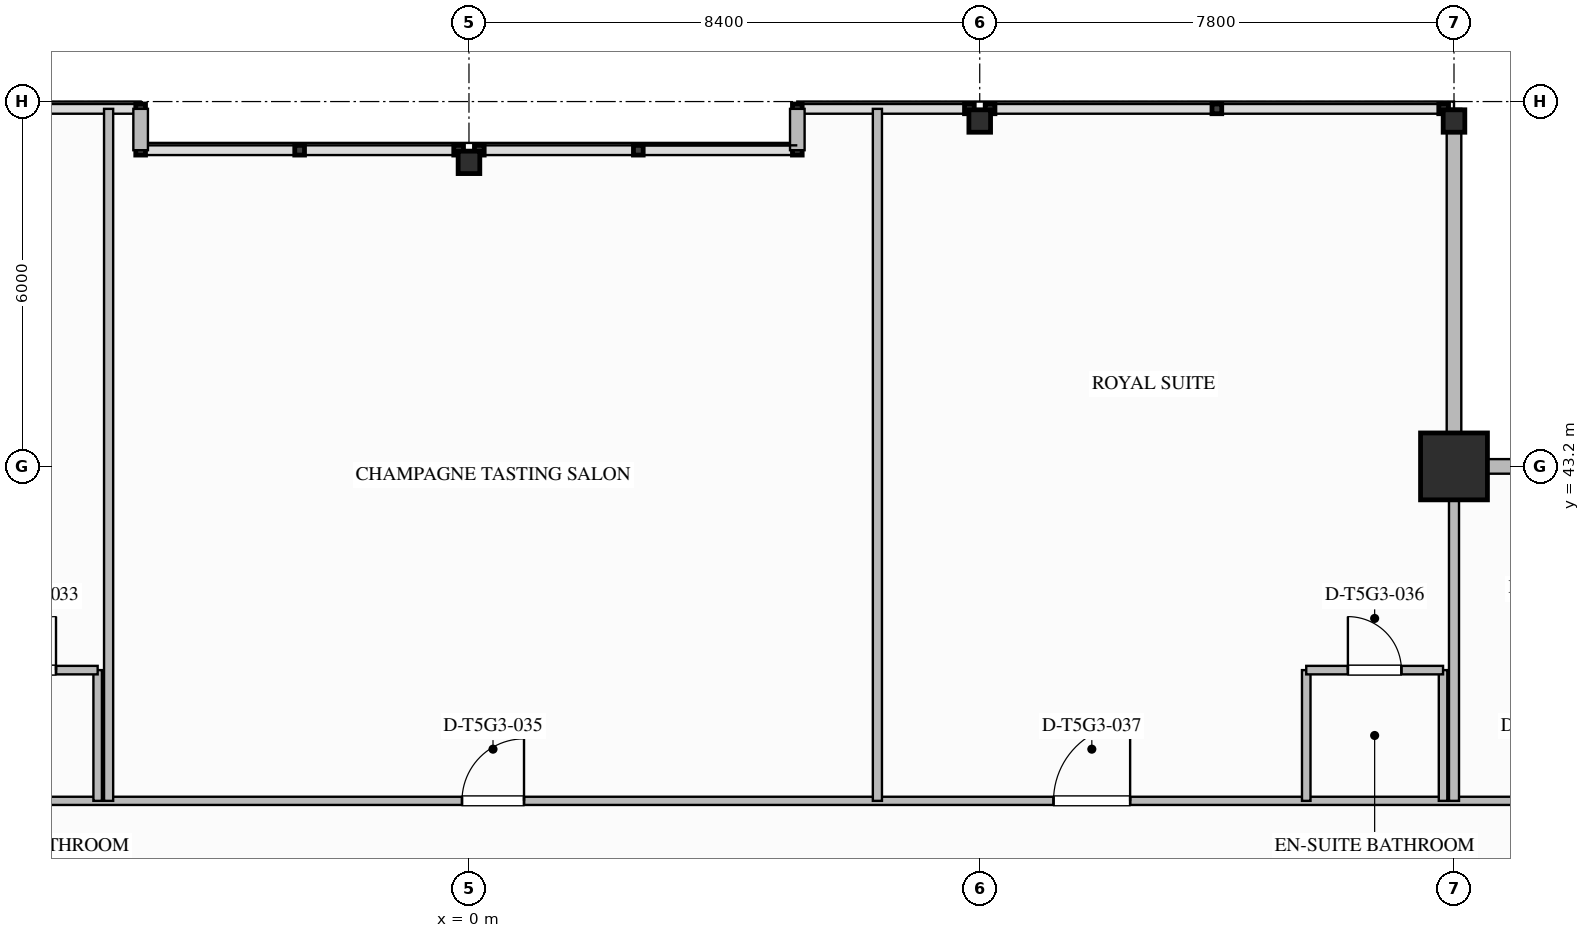
"""IFC4 building model, lengths in metres.
Left out: names, types, materials, properties, quantities, classifications, styles, units other than length and angle.
Written with IfcOpenShell. Run it as: python <this file> out.ifc"""

import sys

from ifc_helpers import new_model, si_unit, direction, frame, frame_2d, origin, origin_2d, place, context, subcontext, project, spatial, rectangle, i_section, extrude, element, fill, save


model = new_model("IFC4")
c1 = context("Model", 3, precision=1e-05, world=origin(), true_north=direction((0.0, 1.0)))
c2 = subcontext(c1, "Body", "Model", "MODEL_VIEW")
j1 = project(units=[si_unit("LENGTHUNIT", "METRE"), si_unit("PLANEANGLEUNIT", "RADIAN")], contexts=[c1])
p1 = place(None, origin())
s1 = spatial("IfcSite", under=j1, at=p1, CompositionType="ELEMENT")
p2 = place(p1, origin())
s2 = spatial("IfcBuilding", under=s1, at=p2, CompositionType="ELEMENT")
p3 = place(p2, frame((0.0, 0.0, 286.9)))
s3 = spatial("IfcBuildingStorey", under=s2, at=p3, CompositionType="ELEMENT", Elevation=286.9)
p4 = place(p3, frame((16.2, 43.2, 0.0), z_axis=(0.0, 0.0, 1.0), x_axis=(1.0, 0.0, 0.0)))
e1 = element("IfcColumn", 1, at=p4, inside=s3, PredefinedType="COLUMN", context=c2, shape_type="SweptSolid", body=[
    extrude(rectangle(XDim=1.1, YDim=1.1, at=origin_2d()), origin(), (0.0, 0.0, 1.0), 3.65),
])
for number, where, z_axis, x_axis in (
    (2, (0.0, 48.2, 0.0), (0.0, 0.0, 1.0), (0.0, 1.0, 0.0)),
    (3, (8.4, 48.88, 0.0), (0.0, 0.0, 1.0), (0.0, 1.0, 0.0)),
    (4, (16.2, 48.88, 0.0), (0.0, 0.0, 1.0), (0.0, 1.0, 0.0)),
):
    element("IfcColumn", number, at=place(p3, frame(where, z_axis=z_axis, x_axis=x_axis)), inside=s3, PredefinedType="COLUMN", context=c2, shape_type="SweptSolid", body=[
        extrude(i_section(OverallWidth=0.369, OverallDepth=0.356, WebThickness=0.011, FlangeThickness=0.018, FilletRadius=0.025, at=origin_2d()), origin(), (0.0, 0.0, 1.0), 3.647),
    ])
for number, where, z_axis, x_axis in (
    (5, (16.2, 49.08, 0.0), (0.0, 0.0, 1.0), (0.0, -1.0, 0.0)),
    (6, (16.2, 43.2, 0.0), (0.0, 0.0, 1.0), (1.0, 0.0, 0.0)),
):
    element("IfcWall", number, at=place(p3, frame(where, z_axis=z_axis, x_axis=x_axis)), inside=s3, PredefinedType="STANDARD", context=c2, shape_type="SweptSolid", body=[
        extrude(rectangle(XDim=5.88, YDim=0.24, at=frame_2d((2.94, 0.0))), origin(), (0.0, 0.0, 1.0), 2.779),
    ])
for number, where, z_axis, x_axis in (
    (7, (-5.4, 49.08, 0.0), (0.0, 0.0, 1.0), (0.0, -1.0, 0.0)),
    (8, (5.4, 48.4, 0.0), (0.0, 0.0, 1.0), (0.0, 1.0, 0.0)),
):
    element("IfcWall", number, at=place(p3, frame(where, z_axis=z_axis, x_axis=x_axis)), inside=s3, PredefinedType="STANDARD", context=c2, shape_type="SweptSolid", body=[
        extrude(rectangle(XDim=0.68, YDim=0.24, at=frame_2d((0.34, 0.0))), origin(), (0.0, 0.0, 1.0), 3.39),
    ])
p5 = place(p3, frame((-16.2, 37.7, 0.0), z_axis=(0.0, 0.0, 1.0), x_axis=(1.0, 0.0, 0.0)))
e9 = element("IfcWall", 9, at=p5, inside=s3, PredefinedType="PARTITIONING", context=c2, shape_type="SweptSolid", body=[
    extrude(rectangle(XDim=38.28, YDim=0.135, at=frame_2d((19.14, 0.0))), origin(), (0.0, 0.0, 1.0), 3.39),
])
p6 = place(p5, frame((33.355, 0.0, 0.0)))
e10 = element("IfcOpeningElement", 10, at=p6, cuts=e9, PredefinedType="OPENING", context=c2, shape_type="SweptSolid", body=[
    extrude(rectangle(XDim=1.26, YDim=2.2, at=frame_2d((0.63, 1.1))), frame((0.0, 0.077, 0.0), z_axis=(0.0, -1.0, 0.0), x_axis=(1.0, 0.0, 0.0)), (0.0, 0.0, 1.0), 0.155),
])
p7 = place(p5, frame((3.292, 0.0, 0.0)))
e11 = element("IfcOpeningElement", 11, at=p7, cuts=e9, PredefinedType="OPENING", context=c2, shape_type="SweptSolid", body=[
    extrude(rectangle(XDim=1.26, YDim=2.2, at=frame_2d((0.63, 1.1))), frame((0.0, 0.077, 0.0), z_axis=(0.0, -1.0, 0.0), x_axis=(1.0, 0.0, 0.0)), (0.0, 0.0, 1.0), 0.155),
])
p8 = place(p5, frame((16.085, 0.0, 0.0)))
e12 = element("IfcOpeningElement", 12, at=p8, cuts=e9, PredefinedType="OPENING", context=c2, shape_type="SweptSolid", body=[
    extrude(rectangle(XDim=1.02, YDim=2.15, at=frame_2d((0.51, 1.075))), frame((0.0, 0.077, 0.0), z_axis=(0.0, -1.0, 0.0), x_axis=(1.0, 0.0, 0.0)), (0.0, 0.0, 1.0), 0.155),
])
p9 = place(p5, frame((25.813, 0.0, 0.0)))
e13 = element("IfcOpeningElement", 13, at=p9, cuts=e9, PredefinedType="OPENING", context=c2, shape_type="SweptSolid", body=[
    extrude(rectangle(XDim=1.26, YDim=2.2, at=frame_2d((0.63, 1.1))), frame((0.0, 0.077, 0.0), z_axis=(0.0, -1.0, 0.0), x_axis=(1.0, 0.0, 0.0)), (0.0, 0.0, 1.0), 0.155),
])
p10 = place(p3, frame((16.2, 37.7, 0.0), z_axis=(0.0, 0.0, 1.0), x_axis=(0.0, 1.0, 0.0)))
e14 = element("IfcWall", 14, at=p10, inside=s3, PredefinedType="PARTITIONING", context=c2, shape_type="SweptSolid", body=[
    extrude(rectangle(XDim=5.38, YDim=0.165, at=frame_2d((2.69, 0.0))), origin(), (0.0, 0.0, 1.0), 2.764),
])
p11 = place(p3, frame((-6.107, 37.7, 0.0), z_axis=(0.0, 0.0, 1.0), x_axis=(0.0, 1.0, 0.0)))
e15 = element("IfcWall", 15, at=p11, inside=s3, PredefinedType="PLUMBINGWALL", context=c2, shape_type="SweptSolid", body=[
    extrude(rectangle(XDim=2.15, YDim=0.14, at=frame_2d((1.075, 0.0))), origin(), (0.0, 0.0, 1.0), 3.39),
])
p12 = place(p3, frame((-8.357, 39.85, 0.0), z_axis=(0.0, 0.0, 1.0), x_axis=(1.0, 0.0, 0.0)))
e16 = element("IfcWall", 16, at=p12, inside=s3, PredefinedType="PLUMBINGWALL", context=c2, shape_type="SweptSolid", body=[
    extrude(rectangle(XDim=2.25, YDim=0.14, at=frame_2d((1.125, 0.0))), origin(), (0.0, 0.0, 1.0), 3.39),
])
p13 = place(p12, frame((0.685, 0.0, 0.0)))
e17 = element("IfcOpeningElement", 17, at=p13, cuts=e16, PredefinedType="OPENING", context=c2, shape_type="SweptSolid", body=[
    extrude(rectangle(XDim=0.88, YDim=2.1, at=frame_2d((0.44, 1.05))), frame((0.0, 0.08, 0.0), z_axis=(0.0, -1.0, 0.0), x_axis=(1.0, 0.0, 0.0)), (0.0, 0.0, 1.0), 0.16),
])
for number, where, z_axis, x_axis in (
    (18, (-5.927, 37.7, 0.0), (0.0, 0.0, 1.0), (0.0, 1.0, 0.0)),
    (19, (6.717, 37.7, 0.0), (0.0, 0.0, 1.0), (0.0, 1.0, 0.0)),
):
    element("IfcWall", number, at=place(p3, frame(where, z_axis=z_axis, x_axis=x_axis)), inside=s3, PredefinedType="PARTITIONING", context=c2, shape_type="SweptSolid", body=[
        extrude(rectangle(XDim=11.38, YDim=0.15, at=frame_2d((5.69, 0.0))), origin(), (0.0, 0.0, 1.0), 3.39),
    ])
p14 = place(p3, frame((13.77, 37.7, 0.0), z_axis=(0.0, 0.0, 1.0), x_axis=(0.0, 1.0, 0.0)))
e20 = element("IfcWall", 20, at=p14, inside=s3, PredefinedType="PLUMBINGWALL", context=c2, shape_type="SweptSolid", body=[
    extrude(rectangle(XDim=2.15, YDim=0.14, at=frame_2d((1.075, 0.0))), origin(), (0.0, 0.0, 1.0), 3.39),
])
p15 = place(p3, frame((16.02, 37.7, 0.0), z_axis=(0.0, 0.0, 1.0), x_axis=(0.0, 1.0, 0.0)))
e21 = element("IfcWall", 21, at=p15, inside=s3, PredefinedType="PLUMBINGWALL", context=c2, shape_type="SweptSolid", body=[
    extrude(rectangle(XDim=2.15, YDim=0.14, at=frame_2d((1.075, 0.0))), origin(), (0.0, 0.0, 1.0), 2.764),
])
p16 = place(p3, frame((13.77, 39.85, 0.0), z_axis=(0.0, 0.0, 1.0), x_axis=(1.0, 0.0, 0.0)))
e22 = element("IfcWall", 22, at=p16, inside=s3, PredefinedType="PLUMBINGWALL", context=c2, shape_type="SweptSolid", body=[
    extrude(rectangle(XDim=2.25, YDim=0.14, at=frame_2d((1.125, 0.0))), origin(), (0.0, 0.0, 1.0), 3.39),
])
p17 = place(p16, frame((0.685, 0.0, 0.0)))
e23 = element("IfcOpeningElement", 23, at=p17, cuts=e22, PredefinedType="OPENING", context=c2, shape_type="SweptSolid", body=[
    extrude(rectangle(XDim=0.88, YDim=2.1, at=frame_2d((0.44, 1.05))), frame((0.0, 0.08, 0.0), z_axis=(0.0, -1.0, 0.0), x_axis=(1.0, 0.0, 0.0)), (0.0, 0.0, 1.0), 0.16),
])
p18 = place(p13, origin())
e24 = element("IfcDoor", 24, at=p18, inside=s3, OperationType="SINGLE_SWING_RIGHT", PredefinedType="DOOR", context=c2, shape_type="SweptSolid", body=[
    extrude(rectangle(XDim=0.88, YDim=2.1, at=frame_2d((0.44, 1.05))), frame((0.0, 0.025, 0.0), z_axis=(0.0, -1.0, 0.0), x_axis=(1.0, 0.0, 0.0)), (0.0, 0.0, 1.0), 0.05),
])
fill(e17, e24)
p19 = place(p8, origin())
e25 = element("IfcDoor", 25, at=p19, inside=s3, OperationType="SINGLE_SWING_RIGHT", PredefinedType="DOOR", context=c2, shape_type="SweptSolid", body=[
    extrude(rectangle(XDim=1.02, YDim=2.15, at=frame_2d((0.51, 1.075))), frame((0.0, 0.025, 0.0), z_axis=(0.0, -1.0, 0.0), x_axis=(1.0, 0.0, 0.0)), (0.0, 0.0, 1.0), 0.05),
])
fill(e12, e25)
p20 = place(p17, origin())
e26 = element("IfcDoor", 26, at=p20, inside=s3, OperationType="SINGLE_SWING_LEFT", PredefinedType="DOOR", context=c2, shape_type="SweptSolid", body=[
    extrude(rectangle(XDim=0.88, YDim=2.1, at=frame_2d((0.44, 1.05))), frame((0.0, 0.025, 0.0), z_axis=(0.0, -1.0, 0.0), x_axis=(1.0, 0.0, 0.0)), (0.0, 0.0, 1.0), 0.05),
])
fill(e23, e26)
p21 = place(p9, origin())
e27 = element("IfcDoor", 27, at=p21, inside=s3, OperationType="SINGLE_SWING_RIGHT", PredefinedType="DOOR", context=c2, shape_type="SweptSolid", body=[
    extrude(rectangle(XDim=1.26, YDim=2.2, at=frame_2d((0.63, 1.1))), frame((0.0, 0.025, 0.0), z_axis=(0.0, -1.0, 0.0), x_axis=(1.0, 0.0, 0.0)), (0.0, 0.0, 1.0), 0.05),
])
fill(e13, e27)
save(model, sys.argv[1])
